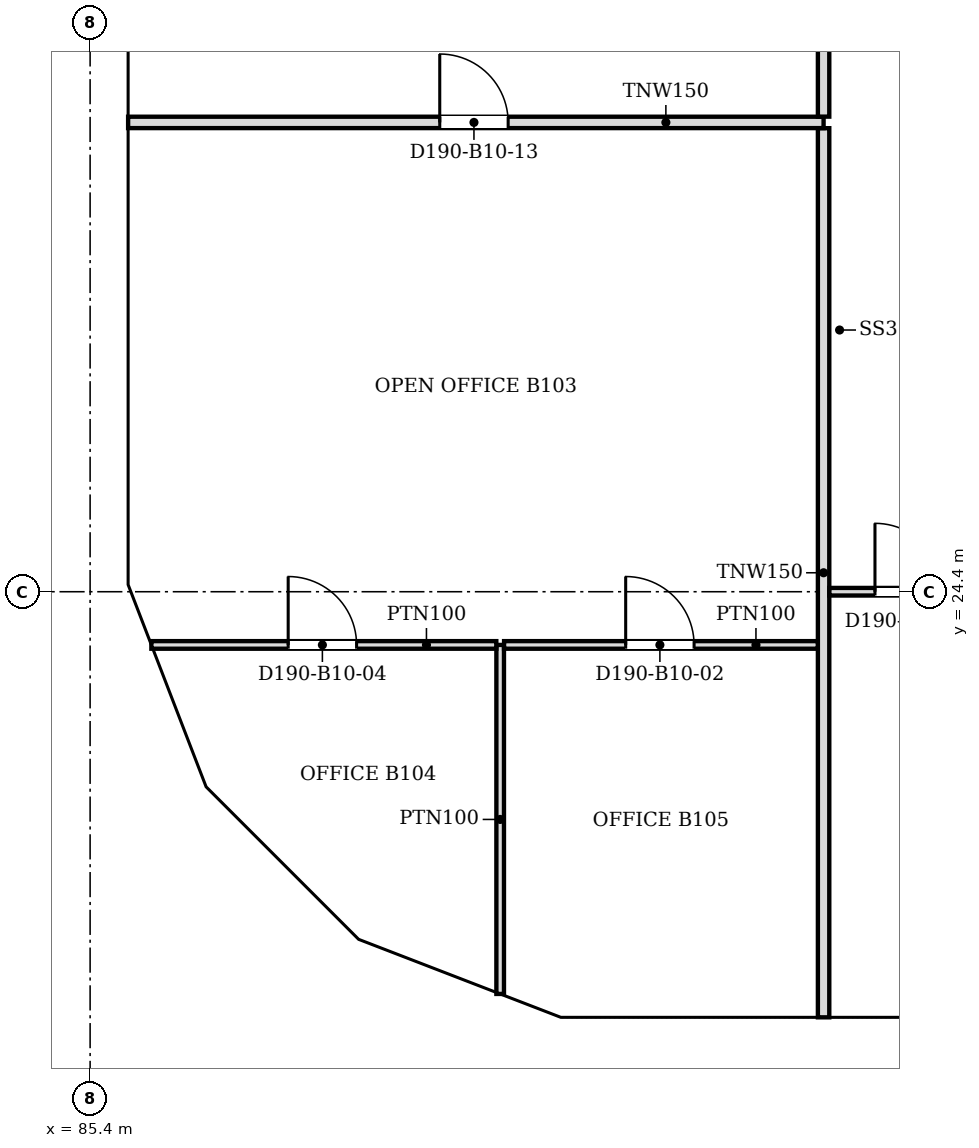
"""IFC4 building model, lengths in metres.
Left out: names, types, materials, properties, quantities, classifications, styles, units other than length and angle.
Written with IfcOpenShell. Run it as: python <this file> out.ifc"""

import sys

from ifc_helpers import new_model, si_unit, direction, frame, frame_2d, origin, place, context, subcontext, project, spatial, polyline, rectangle, outline, extrude, faceted_brep, source, transform, mapped, element, fill, save


model = new_model("IFC4")
c1 = context("Model", 3, precision=1e-05, world=origin(), true_north=direction((0.0, 1.0)))
c2 = subcontext(c1, "Body", "Model", "MODEL_VIEW")
j1 = project(units=[si_unit("LENGTHUNIT", "METRE"), si_unit("PLANEANGLEUNIT", "RADIAN")], contexts=[c1])
p1 = place(None, origin())
s1 = spatial("IfcSite", under=j1, at=p1, CompositionType="ELEMENT")
p2 = place(p1, origin())
s2 = spatial("IfcBuilding", under=s1, at=p2, CompositionType="ELEMENT")
p3 = place(p2, frame((0.0, 0.0, 99.0)))
s3 = spatial("IfcBuildingStorey", under=s2, at=p3, CompositionType="ELEMENT", Elevation=99.0)
m1 = source(origin(), c2, "Body", "Brep", [
    faceted_brep([(3.003, -0.25, 0.0), (6.053, -0.25, 3.8), (3.003, -0.25, 7.6), (0.0, -0.25, 3.8), (0.047, 0.25, 3.859), (3.003, 0.25, 7.6), (6.053, 0.25, 3.8), (3.003, 0.25, 0.0), (0.047, 0.25, 3.741), (0.0, 0.0, 3.8)], [[[0, 1, 2, 3]], [[4, 5, 6, 7, 8]], [[7, 6, 1, 0]], [[6, 5, 2, 1]], [[5, 4, 9, 3, 2]], [[8, 7, 0, 3, 9]], [[8, 9, 4]]]),
])
p4 = place(p3, frame((91.547, 18.55, -3.8), z_axis=(0.0, 0.0, 1.0), x_axis=(1.0, 0.0, 0.0)))
e1 = element("IfcWall", 1, at=p4, inside=s3, PredefinedType="SOLIDWALL", context=c2, shape_type="MappedRepresentation", body=[
    mapped(m1, transform((0.0, 0.0, 0.0), scale=1.0)),
])
m2 = source(origin(), c2, "Body", "SweptSolid", [
    extrude(outline(polyline([(3.005, 0.401), (5.733, 3.8), (3.005, 7.199), (0.319, 3.8), (3.005, 0.401)])), frame((0.0, 0.26, 0.0), z_axis=(0.0, -1.0, 0.0), x_axis=(1.0, 0.0, 0.0)), (0.0, 0.0, 1.0), 0.52),
])
p5 = place(p4, origin())
e2 = element("IfcOpeningElement", 2, at=p5, cuts=e1, PredefinedType="OPENING", context=c2, shape_type="MappedRepresentation", body=[
    mapped(m2, transform((0.0, 0.0, 0.0), scale=1.0)),
])
m3 = source(origin(), c2, "Body", "SweptSolid", [
    extrude(outline(polyline([(3.05, 0.0), (6.1, 3.8), (3.05, 7.6), (0.0, 3.8), (3.05, 0.0)])), frame((0.0, 0.25, 0.0), z_axis=(0.0, -1.0, 0.0), x_axis=(1.0, 0.0, 0.0)), (0.0, 0.0, 1.0), 0.5),
])
p6 = place(p3, frame((85.65, 33.55, -3.8), z_axis=(0.0, 0.0, 1.0), x_axis=(0.0, -1.0, 0.0)))
e3 = element("IfcWall", 3, at=p6, inside=s3, PredefinedType="SOLIDWALL", context=c2, shape_type="MappedRepresentation", body=[
    mapped(m3, transform((0.0, 0.0, 0.0), scale=1.0)),
])
m4 = source(origin(), c2, "Body", "SweptSolid", [
    extrude(outline(polyline([(3.05, 0.399), (5.78, 3.8), (3.05, 7.201), (0.321, 3.8), (3.05, 0.399)])), frame((0.0, 0.26, 0.0), z_axis=(0.0, -1.0, 0.0), x_axis=(1.0, 0.0, 0.0)), (0.0, 0.0, 1.0), 0.52),
])
p7 = place(p6, origin())
e4 = element("IfcOpeningElement", 4, at=p7, cuts=e3, PredefinedType="OPENING", context=c2, shape_type="MappedRepresentation", body=[
    mapped(m4, transform((0.0, 0.0, 0.0), scale=1.0)),
])
m5 = source(origin(), c2, "Body", "Brep", [
    faceted_brep([(3.003, -0.25, 0.0), (3.05, -0.25, 0.06), (3.05, -0.25, 7.54), (3.003, -0.25, 7.6), (0.0, -0.25, 3.8), (0.0, 0.25, 3.8), (2.957, 0.25, 7.541), (2.957, 0.25, 0.059), (3.003, 0.0, 0.0), (3.003, 0.0, 7.6)], [[[0, 1, 2, 3, 4]], [[5, 6, 7]], [[1, 0, 8]], [[9, 3, 2]], [[6, 5, 4, 3, 9]], [[5, 7, 8, 0, 4]], [[1, 8, 7, 6, 9, 2]]]),
])
p8 = place(p3, frame((85.65, 27.45, -3.8), z_axis=(0.0, 0.0, 1.0), x_axis=(0.0, -1.0, 0.0)))
e5 = element("IfcWall", 5, at=p8, inside=s3, PredefinedType="SOLIDWALL", context=c2, shape_type="MappedRepresentation", body=[
    mapped(m5, transform((0.0, 0.0, 0.0), scale=1.0)),
])
m6 = source(origin(), c2, "Body", "SweptSolid", [
    extrude(outline(polyline([(2.803, 6.944), (0.319, 3.8), (2.803, 0.656), (2.803, 6.944)])), frame((0.0, 0.26, 0.0), z_axis=(0.0, -1.0, 0.0), x_axis=(1.0, 0.0, 0.0)), (0.0, 0.0, 1.0), 0.52),
])
p9 = place(p8, origin())
e6 = element("IfcOpeningElement", 6, at=p9, cuts=e5, PredefinedType="OPENING", context=c2, shape_type="MappedRepresentation", body=[
    mapped(m6, transform((0.0, 0.0, 0.0), scale=1.0)),
])
m7 = source(origin(), c2, "Body", "Brep", [
    faceted_brep([(0.047, -0.25, 0.0), (2.997, -0.25, 3.8), (0.047, -0.25, 7.6), (0.0, -0.25, 7.541), (0.0, -0.25, 0.059), (0.093, 0.25, 7.54), (2.944, 0.25, 3.868), (2.944, 0.25, 3.732), (0.093, 0.25, 0.06), (2.997, 0.0, 3.8), (0.047, 0.0, 0.0), (0.047, 0.0, 7.6)], [[[0, 1, 2, 3, 4]], [[5, 6, 7, 8]], [[8, 7, 9, 1, 0, 10]], [[6, 5, 11, 2, 1, 9]], [[3, 2, 11]], [[10, 0, 4]], [[8, 10, 4, 3, 11, 5]], [[9, 7, 6]]]),
])
p10 = place(p3, frame((85.633, 24.49, -3.8), z_axis=(0.0, 0.0, 1.0), x_axis=(0.359901446078, -0.932990326376, 0.0)))
e7 = element("IfcWall", 7, at=p10, inside=s3, PredefinedType="SOLIDWALL", context=c2, shape_type="MappedRepresentation", body=[
    mapped(m7, transform((0.0, 0.0, 0.0), scale=1.0)),
])
m8 = source(origin(), c2, "Body", "SweptSolid", [
    extrude(outline(polyline([(0.247, 0.665), (2.681, 3.8), (0.247, 6.935), (0.247, 0.665)])), frame((0.0, 0.26, 0.0), z_axis=(0.0, -1.0, 0.0), x_axis=(1.0, 0.0, 0.0)), (0.0, 0.0, 1.0), 0.52),
])
p11 = place(p10, origin())
e8 = element("IfcOpeningElement", 8, at=p11, cuts=e7, PredefinedType="OPENING", context=c2, shape_type="MappedRepresentation", body=[
    mapped(m8, transform((0.0, 0.0, 0.0), scale=1.0)),
])
m9 = source(origin(), c2, "Body", "Brep", [
    faceted_brep([(2.944, -0.25, 0.0), (2.997, -0.25, 0.068), (2.997, -0.25, 7.532), (2.944, -0.25, 7.6), (0.0, -0.25, 3.8), (0.053, 0.25, 3.868), (2.891, 0.25, 7.532), (2.891, 0.25, 0.068), (0.053, 0.25, 3.732), (2.944, 0.0, 0.0), (2.944, 0.0, 7.6), (0.0, 0.0, 3.8)], [[[0, 1, 2, 3, 4]], [[5, 6, 7, 8]], [[1, 0, 9]], [[10, 3, 2]], [[6, 5, 11, 4, 3, 10]], [[8, 7, 9, 0, 4, 11]], [[8, 11, 5]], [[1, 9, 7, 6, 10, 2]]]),
])
p12 = place(p3, frame((86.712, 21.694, -3.8), z_axis=(0.0, 0.0, 1.0), x_axis=(0.707066050402, -0.707147509625, 0.0)))
e9 = element("IfcWall", 9, at=p12, inside=s3, PredefinedType="SOLIDWALL", context=c2, shape_type="MappedRepresentation", body=[
    mapped(m9, transform((0.0, 0.0, 0.0), scale=1.0)),
])
m10 = source(origin(), c2, "Body", "SweptSolid", [
    extrude(outline(polyline([(2.744, 6.934), (0.316, 3.8), (2.744, 0.666), (2.744, 6.934)])), frame((0.0, 0.26, 0.0), z_axis=(0.0, -1.0, 0.0), x_axis=(1.0, 0.0, 0.0)), (0.0, 0.0, 1.0), 0.52),
])
p13 = place(p12, origin())
e10 = element("IfcOpeningElement", 10, at=p13, cuts=e9, PredefinedType="OPENING", context=c2, shape_type="MappedRepresentation", body=[
    mapped(m10, transform((0.0, 0.0, 0.0), scale=1.0)),
])
m11 = source(origin(), c2, "Body", "Brep", [
    faceted_brep([(0.053, -0.25, 0.0), (3.003, -0.25, 3.8), (0.053, -0.25, 7.6), (0.0, -0.25, 7.532), (0.0, -0.25, 0.068), (0.106, 0.25, 7.532), (2.957, 0.25, 3.86), (2.957, 0.25, 3.74), (0.106, 0.25, 0.068), (3.003, 0.0, 3.8), (0.053, 0.0, 0.0), (0.053, 0.0, 7.6)], [[[0, 1, 2, 3, 4]], [[5, 6, 7, 8]], [[8, 7, 9, 1, 0, 10]], [[6, 5, 11, 2, 1, 9]], [[3, 2, 11]], [[10, 0, 4]], [[8, 10, 4, 3, 11, 5]], [[9, 7, 6]]]),
])
p14 = place(p3, frame((88.744, 19.631, -3.8), z_axis=(0.0, 0.0, 1.0), x_axis=(0.932997369089, -0.359883188373, 0.0)))
e11 = element("IfcWall", 11, at=p14, inside=s3, PredefinedType="SOLIDWALL", context=c2, shape_type="MappedRepresentation", body=[
    mapped(m11, transform((0.0, 0.0, 0.0), scale=1.0)),
])
m12 = source(origin(), c2, "Body", "SweptSolid", [
    extrude(outline(polyline([(0.253, 0.665), (2.687, 3.8), (0.253, 6.935), (0.253, 0.665)])), frame((0.0, 0.26, 0.0), z_axis=(0.0, -1.0, 0.0), x_axis=(1.0, 0.0, 0.0)), (0.0, 0.0, 1.0), 0.52),
])
p15 = place(p14, origin())
e12 = element("IfcOpeningElement", 12, at=p15, cuts=e11, PredefinedType="OPENING", context=c2, shape_type="MappedRepresentation", body=[
    mapped(m12, transform((0.0, 0.0, 0.0), scale=1.0)),
])
p16 = place(p2, frame((0.0, 0.0, 102.8)))
s4 = spatial("IfcBuildingStorey", under=s2, at=p16, CompositionType="ELEMENT", Elevation=102.8)
m13 = source(origin(), c2, "Body", "Brep", [
    faceted_brep([(0.047, -0.25, 0.0), (3.05, -0.25, 3.8), (0.047, -0.25, 7.6), (0.0, -0.25, 7.54), (0.0, -0.25, 0.06), (0.093, 0.25, 7.541), (3.05, 0.25, 3.8), (0.093, 0.25, 0.059), (0.047, 0.0, 0.0), (0.047, 0.0, 7.6)], [[[0, 1, 2, 3, 4]], [[5, 6, 7]], [[7, 6, 1, 0, 8]], [[6, 5, 9, 2, 1]], [[3, 2, 9]], [[8, 0, 4]], [[7, 8, 4, 3, 9, 5]]]),
])
p17 = place(p16, frame((91.5, 18.55, -3.8), z_axis=(0.0, 0.0, 1.0), x_axis=(1.0, 0.0, 0.0)))
e13 = element("IfcWall", 13, at=p17, inside=s4, PredefinedType="SOLIDWALL", context=c2, shape_type="MappedRepresentation", body=[
    mapped(m13, transform((0.0, 0.0, 0.0), scale=1.0)),
])
m14 = source(origin(), c2, "Body", "SweptSolid", [
    extrude(outline(polyline([(0.247, 0.656), (2.731, 3.8), (0.247, 6.944), (0.247, 0.656)])), frame((0.0, 0.26, 0.0), z_axis=(0.0, -1.0, 0.0), x_axis=(1.0, 0.0, 0.0)), (0.0, 0.0, 1.0), 0.52),
])
p18 = place(p17, origin())
e14 = element("IfcOpeningElement", 14, at=p18, cuts=e13, PredefinedType="OPENING", context=c2, shape_type="MappedRepresentation", body=[
    mapped(m14, transform((0.0, 0.0, 0.0), scale=1.0)),
])
m15 = source(origin(), c2, "Body", "Brep", [
    faceted_brep([(2.95, -0.25, 0.0), (2.997, -0.25, 0.059), (2.997, -0.25, 7.541), (2.95, -0.25, 7.6), (0.0, -0.25, 3.8), (0.053, 0.25, 3.868), (2.904, 0.25, 7.54), (2.904, 0.25, 0.06), (0.053, 0.25, 3.732), (2.95, 0.0, 0.0), (2.95, 0.0, 7.6), (0.0, 0.0, 3.8)], [[[0, 1, 2, 3, 4]], [[5, 6, 7, 8]], [[1, 0, 9]], [[10, 3, 2]], [[6, 5, 11, 4, 3, 10]], [[8, 7, 9, 0, 4, 11]], [[8, 11, 5]], [[1, 9, 7, 6, 10, 2]]]),
])
p19 = place(p16, frame((88.794, 19.612, -3.8), z_axis=(0.0, 0.0, 1.0), x_axis=(0.933000876937, -0.359874094142, 0.0)))
e15 = element("IfcWall", 15, at=p19, inside=s4, PredefinedType="SOLIDWALL", context=c2, shape_type="MappedRepresentation", body=[
    mapped(m15, transform((0.0, 0.0, 0.0), scale=1.0)),
])
m16 = source(origin(), c2, "Body", "SweptSolid", [
    extrude(outline(polyline([(2.75, 6.935), (0.316, 3.8), (2.75, 0.665), (2.75, 6.935)])), frame((0.0, 0.26, 0.0), z_axis=(0.0, -1.0, 0.0), x_axis=(1.0, 0.0, 0.0)), (0.0, 0.0, 1.0), 0.52),
])
p20 = place(p19, origin())
e16 = element("IfcOpeningElement", 16, at=p20, cuts=e15, PredefinedType="OPENING", context=c2, shape_type="MappedRepresentation", body=[
    mapped(m16, transform((0.0, 0.0, 0.0), scale=1.0)),
])
m17 = source(origin(), c2, "Body", "Brep", [
    faceted_brep([(3.05, -0.25, 0.0), (6.1, -0.25, 3.8), (6.1, -0.25, 3.8), (3.05, -0.25, 7.6), (0.0, -0.25, 3.8), (0.0, 0.25, 3.8), (3.05, 0.25, 7.6), (6.1, 0.25, 3.8), (6.1, 0.25, 3.8), (3.05, 0.25, 0.0)], [[[0, 1, 2, 3, 4]], [[5, 6, 7, 8, 9]], [[9, 8, 1, 0]], [[7, 6, 3, 2]], [[6, 5, 4, 3]], [[5, 9, 0, 4]], [[1, 8, 7, 2]]]),
])
p21 = place(p16, frame((94.55, 18.55, -3.8), z_axis=(0.0, 0.0, 1.0), x_axis=(1.0, 0.0, 0.0)))
e17 = element("IfcWall", 17, at=p21, inside=s4, PredefinedType="SOLIDWALL", context=c2, shape_type="MappedRepresentation", body=[
    mapped(m17, transform((0.0, 0.0, 0.0), scale=1.0)),
])
p22 = place(p21, origin())
e18 = element("IfcOpeningElement", 18, at=p22, cuts=e17, PredefinedType="OPENING", context=c2, shape_type="MappedRepresentation", body=[
    mapped(m4, transform((0.0, 0.0, 0.0), scale=1.0)),
])
p23 = place(p16, frame((85.65, 36.6, -3.8), z_axis=(0.0, 0.0, 1.0), x_axis=(0.0, -1.0, 0.0)))
e19 = element("IfcWall", 19, at=p23, inside=s4, PredefinedType="SOLIDWALL", context=c2, shape_type="MappedRepresentation", body=[
    mapped(m3, transform((0.0, 0.0, 0.0), scale=1.0)),
])
p24 = place(p23, origin())
e20 = element("IfcOpeningElement", 20, at=p24, cuts=e19, PredefinedType="OPENING", context=c2, shape_type="MappedRepresentation", body=[
    mapped(m4, transform((0.0, 0.0, 0.0), scale=1.0)),
])
m18 = source(origin(), c2, "Body", "Brep", [
    faceted_brep([(3.05, -0.25, 0.0), (6.053, -0.25, 3.8), (3.05, -0.25, 7.6), (0.0, -0.25, 3.8), (0.0, 0.25, 3.8), (3.05, 0.25, 7.6), (6.007, 0.25, 3.859), (6.007, 0.25, 3.741), (3.05, 0.25, 0.0), (6.053, 0.0, 3.8)], [[[0, 1, 2, 3]], [[4, 5, 6, 7, 8]], [[8, 7, 9, 1, 0]], [[6, 5, 2, 1, 9]], [[5, 4, 3, 2]], [[4, 8, 0, 3]], [[9, 7, 6]]]),
])
p25 = place(p16, frame((85.65, 30.5, -3.8), z_axis=(0.0, 0.0, 1.0), x_axis=(0.0, -1.0, 0.0)))
e21 = element("IfcWall", 21, at=p25, inside=s4, PredefinedType="SOLIDWALL", context=c2, shape_type="MappedRepresentation", body=[
    mapped(m18, transform((0.0, 0.0, 0.0), scale=1.0)),
])
m19 = source(origin(), c2, "Body", "SweptSolid", [
    extrude(outline(polyline([(3.049, 0.401), (5.735, 3.8), (3.049, 7.199), (0.321, 3.8), (3.049, 0.401)])), frame((0.0, 0.26, 0.0), z_axis=(0.0, -1.0, 0.0), x_axis=(1.0, 0.0, 0.0)), (0.0, 0.0, 1.0), 0.52),
])
p26 = place(p25, origin())
e22 = element("IfcOpeningElement", 22, at=p26, cuts=e21, PredefinedType="OPENING", context=c2, shape_type="MappedRepresentation", body=[
    mapped(m19, transform((0.0, 0.0, 0.0), scale=1.0)),
])
m20 = source(origin(), c2, "Body", "Brep", [
    faceted_brep([(2.95, -0.25, 0.0), (3.003, -0.25, 0.068), (3.003, -0.25, 7.532), (2.95, -0.25, 7.6), (0.0, -0.25, 3.8), (0.047, 0.25, 3.86), (2.898, 0.25, 7.532), (2.898, 0.25, 0.068), (0.047, 0.25, 3.74), (2.95, 0.0, 0.0), (2.95, 0.0, 7.6), (0.0, 0.0, 3.8)], [[[0, 1, 2, 3, 4]], [[5, 6, 7, 8]], [[1, 0, 9]], [[10, 3, 2]], [[6, 5, 11, 4, 3, 10]], [[8, 7, 9, 0, 4, 11]], [[8, 11, 5]], [[1, 9, 7, 6, 10, 2]]]),
])
p27 = place(p16, frame((85.65, 24.447, -3.8), z_axis=(0.0, 0.0, 1.0), x_axis=(0.35992665181, -0.932980602862, 0.0)))
e23 = element("IfcWall", 23, at=p27, inside=s4, PredefinedType="SOLIDWALL", context=c2, shape_type="MappedRepresentation", body=[
    mapped(m20, transform((0.0, 0.0, 0.0), scale=1.0)),
])
p28 = place(p27, origin())
e24 = element("IfcOpeningElement", 24, at=p28, cuts=e23, PredefinedType="OPENING", context=c2, shape_type="MappedRepresentation", body=[
    mapped(m16, transform((0.0, 0.0, 0.0), scale=1.0)),
])
m21 = source(origin(), c2, "Body", "Brep", [
    faceted_brep([(0.053, -0.25, 0.0), (2.997, -0.25, 3.8), (0.053, -0.25, 7.6), (0.0, -0.25, 7.532), (0.0, -0.25, 0.068), (0.106, 0.25, 7.532), (2.944, 0.25, 3.868), (2.944, 0.25, 3.732), (0.106, 0.25, 0.068), (2.997, 0.0, 3.8), (0.053, 0.0, 0.0), (0.053, 0.0, 7.6)], [[[0, 1, 2, 3, 4]], [[5, 6, 7, 8]], [[8, 7, 9, 1, 0, 10]], [[6, 5, 11, 2, 1, 9]], [[3, 2, 11]], [[10, 0, 4]], [[8, 10, 4, 3, 11, 5]], [[9, 7, 6]]]),
])
p29 = place(p16, frame((86.675, 21.731, -3.8), z_axis=(0.0, 0.0, 1.0), x_axis=(0.707106781187, -0.707106781187, 0.0)))
e25 = element("IfcWall", 25, at=p29, inside=s4, PredefinedType="SOLIDWALL", context=c2, shape_type="MappedRepresentation", body=[
    mapped(m21, transform((0.0, 0.0, 0.0), scale=1.0)),
])
m22 = source(origin(), c2, "Body", "SweptSolid", [
    extrude(outline(polyline([(0.253, 0.666), (2.681, 3.8), (0.253, 6.934), (0.253, 0.666)])), frame((0.0, 0.26, 0.0), z_axis=(0.0, -1.0, 0.0), x_axis=(1.0, 0.0, 0.0)), (0.0, 0.0, 1.0), 0.52),
])
p30 = place(p29, origin())
e26 = element("IfcOpeningElement", 26, at=p30, cuts=e25, PredefinedType="OPENING", context=c2, shape_type="MappedRepresentation", body=[
    mapped(m22, transform((0.0, 0.0, 0.0), scale=1.0)),
])
p31 = place(p3, frame((95.05, 18.8, 0.0), z_axis=(0.0, 0.0, 1.0), x_axis=(0.0, 1.0, 0.0)))
e27 = element("IfcWall", 27, at=p31, inside=s3, PredefinedType="PARTITIONING", context=c2, shape_type="SweptSolid", body=[
    extrude(rectangle(XDim=11.699, YDim=0.15, at=frame_2d((5.85, 0.0))), origin(), (0.0, 0.0, 1.0), 3.067),
])
p32 = place(p3, frame((90.795, 19.108, 0.0), z_axis=(0.0, 0.0, 1.0), x_axis=(0.0, 1.0, 0.0)))
e28 = element("IfcWall", 28, at=p32, inside=s3, PredefinedType="PARTITIONING", context=c2, shape_type="SweptSolid", body=[
    extrude(rectangle(XDim=4.592, YDim=0.1, at=frame_2d((2.296, 0.0))), origin(), (0.0, 0.0, 1.0), 3.067),
])
p33 = place(p3, frame((90.744, 23.7, 0.0), z_axis=(0.0, 0.0, 1.0), x_axis=(-1.0, 0.0, 0.0)))
e29 = element("IfcWall", 29, at=p33, inside=s3, PredefinedType="PARTITIONING", context=c2, shape_type="SweptSolid", body=[
    extrude(rectangle(XDim=4.538, YDim=0.1, at=frame_2d((2.269, 0.0))), origin(), (0.0, 0.0, 1.0), 3.067),
])
m23 = source(origin(), c2, "Body", "SweptSolid", [
    extrude(rectangle(XDim=0.9, YDim=2.1, at=frame_2d((0.45, 1.05))), frame((0.0, 0.06, 0.0), z_axis=(0.0, -1.0, 0.0), x_axis=(1.0, 0.0, 0.0)), (0.0, 0.0, 1.0), 0.12),
])
p34 = place(p33, frame((1.838, 0.0, 0.0)))
e30 = element("IfcOpeningElement", 30, at=p34, cuts=e29, PredefinedType="OPENING", context=c2, shape_type="MappedRepresentation", body=[
    mapped(m23, transform((0.0, 0.0, 0.0), scale=1.0)),
])
p35 = place(p3, frame((94.974, 23.7, 0.0), z_axis=(0.0, 0.0, 1.0), x_axis=(-1.0, 0.0, 0.0)))
e31 = element("IfcWall", 31, at=p35, inside=s3, PredefinedType="PARTITIONING", context=c2, shape_type="SweptSolid", body=[
    extrude(rectangle(XDim=4.128, YDim=0.1, at=frame_2d((2.064, 0.0))), origin(), (0.0, 0.0, 1.0), 3.067),
])
p36 = place(p35, frame((1.628, 0.0, 0.0)))
e32 = element("IfcOpeningElement", 32, at=p36, cuts=e31, PredefinedType="OPENING", context=c2, shape_type="MappedRepresentation", body=[
    mapped(m23, transform((0.0, 0.0, 0.0), scale=1.0)),
])
p37 = place(p3, frame((97.249, 24.4, 0.0), z_axis=(0.0, 0.0, 1.0), x_axis=(-1.0, 0.0, 0.0)))
e33 = element("IfcWall", 33, at=p37, inside=s3, PredefinedType="PARTITIONING", context=c2, shape_type="SweptSolid", body=[
    extrude(rectangle(XDim=2.123, YDim=0.1, at=frame_2d((1.062, 0.0))), origin(), (0.0, 0.0, 1.0), 3.067),
])
p38 = place(p37, frame((0.623, 0.0, 0.0)))
e34 = element("IfcOpeningElement", 34, at=p38, cuts=e33, PredefinedType="OPENING", context=c2, shape_type="MappedRepresentation", body=[
    mapped(m23, transform((0.0, 0.0, 0.0), scale=1.0)),
])
p39 = place(p3, frame((95.05, 30.575, 0.0), z_axis=(0.0, 0.0, 1.0), x_axis=(-1.0, 0.0, 0.0)))
e35 = element("IfcWall", 35, at=p39, inside=s3, PredefinedType="PARTITIONING", context=c2, shape_type="SweptSolid", body=[
    extrude(rectangle(XDim=9.15, YDim=0.15, at=frame_2d((4.575, 0.0))), origin(), (0.0, 0.0, 1.0), 3.067),
])
m24 = source(origin(), c2, "Body", "SweptSolid", [
    extrude(rectangle(XDim=0.9, YDim=2.1, at=frame_2d((0.45, 1.05))), frame((0.0, 0.085, 0.0), z_axis=(0.0, -1.0, 0.0), x_axis=(1.0, 0.0, 0.0)), (0.0, 0.0, 1.0), 0.17),
])
p40 = place(p39, frame((4.15, 0.0, 0.0)))
e36 = element("IfcOpeningElement", 36, at=p40, cuts=e35, PredefinedType="OPENING", context=c2, shape_type="MappedRepresentation", body=[
    mapped(m24, transform((0.0, 0.0, 0.0), scale=1.0)),
])
p41 = place(p3, frame((95.05, 30.651, 0.0), z_axis=(0.0, 0.0, 1.0), x_axis=(0.0, 1.0, 0.0)))
e37 = element("IfcWall", 37, at=p41, inside=s3, PredefinedType="PARTITIONING", context=c2, shape_type="SweptSolid", body=[
    extrude(rectangle(XDim=3.273, YDim=0.15, at=frame_2d((1.637, 0.0))), origin(), (0.0, 0.0, 1.0), 3.067),
])
m25 = source(origin(), c2, "Body", "SweptSolid", [
    extrude(rectangle(XDim=0.9, YDim=2.1, at=frame_2d((0.45, 1.05))), frame((0.0, 0.025, 0.0), z_axis=(0.0, -1.0, 0.0), x_axis=(1.0, 0.0, 0.0)), (0.0, 0.0, 1.0), 0.05),
])
p42 = place(p38, origin())
e38 = element("IfcDoor", 38, at=p42, inside=s3, OperationType="SINGLE_SWING_RIGHT", PredefinedType="DOOR", context=c2, shape_type="MappedRepresentation", body=[
    mapped(m25, transform((0.0, 0.0, 0.0), scale=1.0)),
])
fill(e34, e38)
p43 = place(p36, origin())
e39 = element("IfcDoor", 39, at=p43, inside=s3, OperationType="SINGLE_SWING_RIGHT", PredefinedType="DOOR", context=c2, shape_type="MappedRepresentation", body=[
    mapped(m25, transform((0.0, 0.0, 0.0), scale=1.0)),
])
fill(e32, e39)
p44 = place(p34, origin())
e40 = element("IfcDoor", 40, at=p44, inside=s3, OperationType="SINGLE_SWING_RIGHT", PredefinedType="DOOR", context=c2, shape_type="MappedRepresentation", body=[
    mapped(m25, transform((0.0, 0.0, 0.0), scale=1.0)),
])
fill(e30, e40)
p45 = place(p40, origin())
e41 = element("IfcDoor", 41, at=p45, inside=s3, OperationType="SINGLE_SWING_RIGHT", PredefinedType="DOOR", context=c2, shape_type="MappedRepresentation", body=[
    mapped(m25, transform((0.0, 0.0, 0.0), scale=1.0)),
])
fill(e36, e41)
save(model, sys.argv[1])
